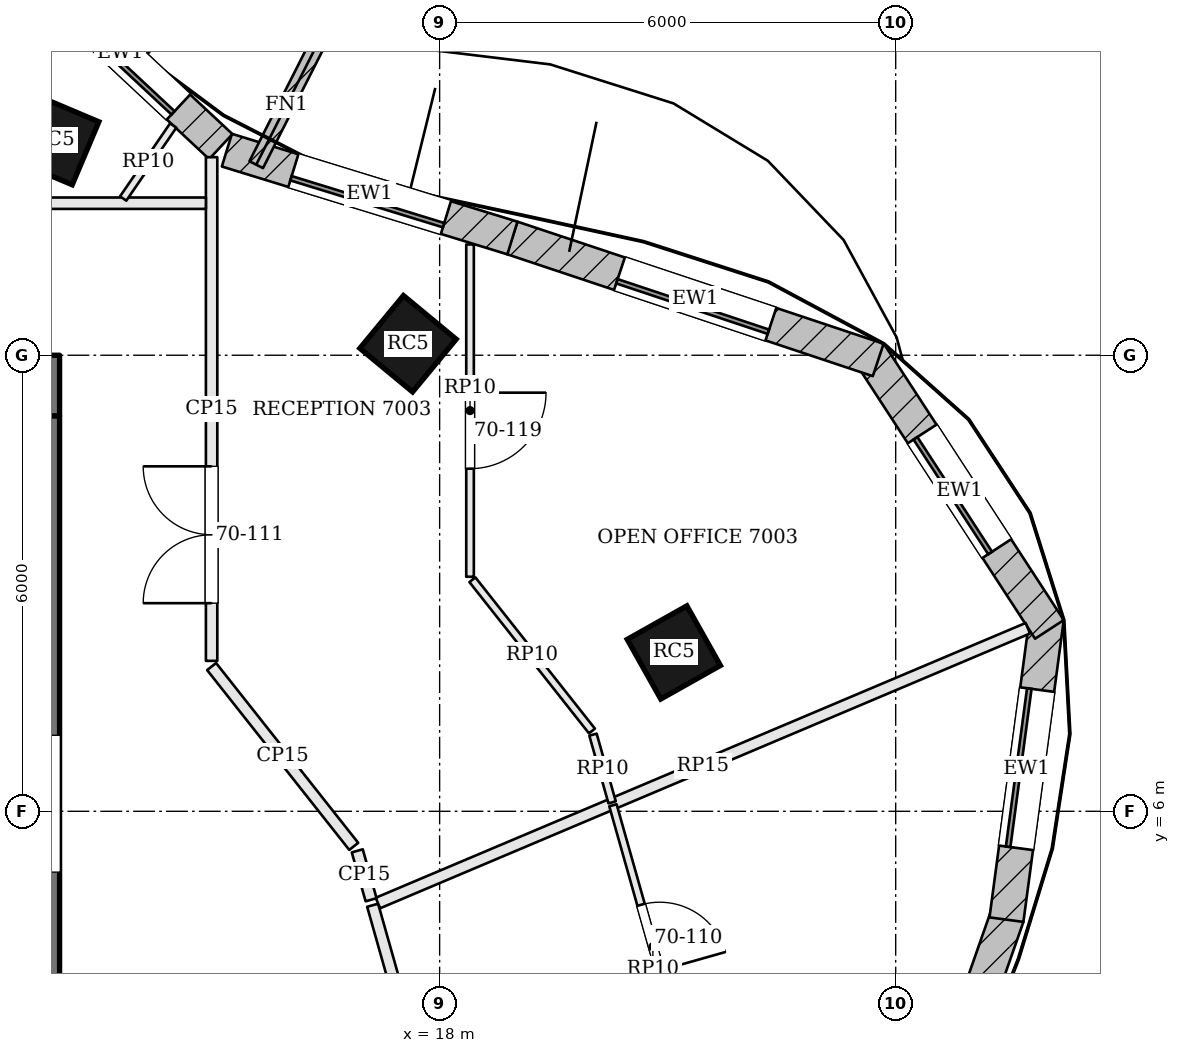
"""IFC4 building model, lengths in metres.
Left out: names, types, materials, properties, quantities, classifications, styles, units other than length and angle.
Written with IfcOpenShell. Run it as: python <this file> out.ifc"""

import sys

from ifc_helpers import new_model, si_unit, direction, frame, frame_2d, origin, origin_2d, place, context, subcontext, project, spatial, rectangle, extrude, element, fill, save


model = new_model("IFC4")
c1 = context("Model", 3, precision=1e-05, world=origin(), true_north=direction((0.0, 1.0)))
c2 = subcontext(c1, "Body", "Model", "MODEL_VIEW")
j1 = project(units=[si_unit("LENGTHUNIT", "METRE"), si_unit("PLANEANGLEUNIT", "RADIAN")], contexts=[c1])
p1 = place(None, origin())
s1 = spatial("IfcSite", under=j1, at=p1, CompositionType="ELEMENT")
p2 = place(p1, origin())
s2 = spatial("IfcBuilding", under=s1, at=p2, CompositionType="ELEMENT")
p3 = place(p2, frame((0.0, 0.0, 284.4)))
s3 = spatial("IfcBuildingStorey", under=s2, at=p3, CompositionType="ELEMENT", Elevation=284.4)
p4 = place(p3, frame((-13.0, 11.6, 0.0), z_axis=(0.0, 0.0, 1.0), x_axis=(1.0, 0.0, 0.0)))
e1 = element("IfcWall", 1, at=p4, inside=s3, PredefinedType="SHEAR", context=c2, shape_type="SweptSolid", body=[
    extrude(rectangle(XDim=26.0, YDim=0.8, at=frame_2d((13.0, 0.0))), origin(), (0.0, 0.0, 1.0), 3.9),
])
p5 = place(p4, frame((9.65, 0.0, 0.0)))
e2 = element("IfcOpeningElement", 2, at=p5, cuts=e1, PredefinedType="OPENING", context=c2, shape_type="SweptSolid", body=[
    extrude(rectangle(XDim=1.0, YDim=2.1, at=frame_2d((0.5, 1.05))), frame((0.0, 0.41, 0.0), z_axis=(0.0, -1.0, 0.0), x_axis=(1.0, 0.0, 0.0)), (0.0, 0.0, 1.0), 0.82),
])
p6 = place(p4, frame((12.675, 0.0, 0.0)))
e3 = element("IfcOpeningElement", 3, at=p6, cuts=e1, PredefinedType="OPENING", context=c2, shape_type="SweptSolid", body=[
    extrude(rectangle(XDim=0.7, YDim=2.1, at=frame_2d((0.35, 1.05))), frame((0.0, 0.41, 0.0), z_axis=(0.0, -1.0, 0.0), x_axis=(1.0, 0.0, 0.0)), (0.0, 0.0, 1.0), 0.82),
])
p7 = place(p4, frame((14.725, 0.0, 0.0)))
e4 = element("IfcOpeningElement", 4, at=p7, cuts=e1, PredefinedType="OPENING", context=c2, shape_type="SweptSolid", body=[
    extrude(rectangle(XDim=0.7, YDim=2.1, at=frame_2d((0.35, 1.05))), frame((0.0, 0.41, 0.0), z_axis=(0.0, -1.0, 0.0), x_axis=(1.0, 0.0, 0.0)), (0.0, 0.0, 1.0), 0.82),
])
p8 = place(p4, frame((16.6, 0.0, 0.0)))
e5 = element("IfcOpeningElement", 5, at=p8, cuts=e1, PredefinedType="OPENING", context=c2, shape_type="SweptSolid", body=[
    extrude(rectangle(XDim=1.0, YDim=2.1, at=frame_2d((0.5, 1.05))), frame((0.0, 0.41, 0.0), z_axis=(0.0, -1.0, 0.0), x_axis=(1.0, 0.0, 0.0)), (0.0, 0.0, 1.0), 0.82),
])
p9 = place(p3, frame((12.6, -2.2, 0.0), z_axis=(0.0, 0.0, 1.0), x_axis=(0.0, 1.0, 0.0)))
e6 = element("IfcWall", 6, at=p9, inside=s3, PredefinedType="SHEAR", context=c2, shape_type="SweptSolid", body=[
    extrude(rectangle(XDim=13.4, YDim=0.8, at=frame_2d((6.7, 0.0))), origin(), (0.0, 0.0, 1.0), 3.9),
])
p10 = place(p9, frame((7.4, 0.0, 0.0)))
e7 = element("IfcOpeningElement", 7, at=p10, cuts=e6, PredefinedType="OPENING", context=c2, shape_type="SweptSolid", body=[
    extrude(rectangle(XDim=1.8, YDim=2.1, at=frame_2d((0.9, 1.05))), frame((0.0, 0.41, 0.0), z_axis=(0.0, -1.0, 0.0), x_axis=(1.0, 0.0, 0.0)), (0.0, 0.0, 1.0), 0.82),
])
for number, where, z_axis, x_axis in (
    (8, (21.081, 8.09, 0.0), (0.0, 0.0, 1.0), (-0.49, 0.872, 0.0)),
    (9, (17.584, 12.151, 0.0), (0.0, 0.0, 1.0), (-0.771, 0.637, 0.0)),
    (10, (12.927, 14.832, 0.0), (0.0, 0.0, 1.0), (-0.921, 0.389, 0.0)),
):
    element("IfcColumn", number, at=place(p3, frame(where, z_axis=z_axis, x_axis=x_axis)), inside=s3, PredefinedType="COLUMN", context=c2, shape_type="SweptSolid", body=[
        extrude(rectangle(XDim=0.9, YDim=0.9, at=origin_2d()), origin(), (0.0, 0.0, 1.0), 3.9),
    ])
p11 = place(p3, frame((23.782, -0.189, 0.0), z_axis=(0.0, 0.0, 1.0), x_axis=(0.330794307703, 0.943702880144, 0.0)))
e11 = element("IfcWall", 11, at=p11, inside=s3, PredefinedType="SOLIDWALL", context=c2, shape_type="SweptSolid", body=[
    extrude(rectangle(XDim=5.095, YDim=0.45, at=frame_2d((2.548, 0.0))), origin(), (0.0, 0.0, 1.0), 3.7),
])
p12 = place(p11, frame((1.498, 0.0, 0.9)))
e12 = element("IfcOpeningElement", 12, at=p12, cuts=e11, PredefinedType="OPENING", context=c2, shape_type="SweptSolid", body=[
    extrude(rectangle(XDim=2.1, YDim=2.3, at=frame_2d((1.05, 1.15))), frame((0.0, 0.235, 0.0), z_axis=(0.0, -1.0, 0.0), x_axis=(1.0, 0.0, 0.0)), (0.0, 0.0, 1.0), 0.47),
])
p13 = place(p3, frame((25.457, 4.575, 0.0), z_axis=(0.0, 0.0, 1.0), x_axis=(0.132475046402, 0.991186340746, 0.0)))
e13 = element("IfcWall", 13, at=p13, inside=s3, PredefinedType="SOLIDWALL", context=c2, shape_type="SweptSolid", body=[
    extrude(rectangle(XDim=4.007, YDim=0.45, at=frame_2d((2.003, 0.0))), origin(), (0.0, 0.0, 1.0), 3.7),
])
p14 = place(p13, frame((0.953, 0.0, 0.9)))
e14 = element("IfcOpeningElement", 14, at=p14, cuts=e13, PredefinedType="OPENING", context=c2, shape_type="SweptSolid", body=[
    extrude(rectangle(XDim=2.1, YDim=2.3, at=frame_2d((1.05, 1.15))), frame((0.0, 0.235, 0.0), z_axis=(0.0, -1.0, 0.0), x_axis=(1.0, 0.0, 0.0)), (0.0, 0.0, 1.0), 0.47),
])
p15 = place(p3, frame((26.022, 8.393, 0.0), z_axis=(0.0, 0.0, 1.0), x_axis=(-0.545637310328, 0.838021435035, 0.0)))
e15 = element("IfcWall", 15, at=p15, inside=s3, PredefinedType="SOLIDWALL", context=c2, shape_type="SweptSolid", body=[
    extrude(rectangle(XDim=4.336, YDim=0.45, at=frame_2d((2.168, 0.0))), origin(), (0.0, 0.0, 1.0), 3.7),
])
p16 = place(p15, frame((1.268, 0.0, 0.9)))
e16 = element("IfcOpeningElement", 16, at=p16, cuts=e15, PredefinedType="OPENING", context=c2, shape_type="SweptSolid", body=[
    extrude(rectangle(XDim=1.8, YDim=2.3, at=frame_2d((0.9, 1.15))), frame((0.0, 0.235, 0.0), z_axis=(0.0, -1.0, 0.0), x_axis=(1.0, 0.0, 0.0)), (0.0, 0.0, 1.0), 0.47),
])
p17 = place(p3, frame((23.77, 11.938, 0.0), z_axis=(0.0, 0.0, 1.0), x_axis=(-0.948673679101, 0.316256621402, 0.0)))
e17 = element("IfcWall", 17, at=p17, inside=s3, PredefinedType="SOLIDWALL", context=c2, shape_type="SweptSolid", body=[
    extrude(rectangle(XDim=5.076, YDim=0.45, at=frame_2d((2.538, 0.0))), origin(), (0.0, 0.0, 1.0), 3.7),
])
p18 = place(p17, frame((1.488, 0.0, 0.9)))
e18 = element("IfcOpeningElement", 18, at=p18, cuts=e17, PredefinedType="OPENING", context=c2, shape_type="SweptSolid", body=[
    extrude(rectangle(XDim=2.1, YDim=2.3, at=frame_2d((1.05, 1.15))), frame((0.0, 0.235, 0.0), z_axis=(0.0, -1.0, 0.0), x_axis=(1.0, 0.0, 0.0)), (0.0, 0.0, 1.0), 0.47),
])
p19 = place(p3, frame((18.958, 13.542, 0.0), z_axis=(0.0, 0.0, 1.0), x_axis=(-0.955792437529, 0.294042201668, 0.0)))
e19 = element("IfcWall", 19, at=p19, inside=s3, PredefinedType="SOLIDWALL", context=c2, shape_type="SweptSolid", body=[
    extrude(rectangle(XDim=3.931, YDim=0.45, at=frame_2d((1.965, 0.0))), origin(), (0.0, 0.0, 1.0), 3.7),
])
p20 = place(p19, frame((0.915, 0.0, 0.9)))
e20 = element("IfcOpeningElement", 20, at=p20, cuts=e19, PredefinedType="OPENING", context=c2, shape_type="SweptSolid", body=[
    extrude(rectangle(XDim=2.1, YDim=2.3, at=frame_2d((1.05, 1.15))), frame((0.0, 0.235, 0.0), z_axis=(0.0, -1.0, 0.0), x_axis=(1.0, 0.0, 0.0)), (0.0, 0.0, 1.0), 0.47),
])
p21 = place(p3, frame((15.121, 14.745, 0.0), z_axis=(0.0, 0.0, 1.0), x_axis=(-0.730618259172, 0.68278617397, 0.0)))
e21 = element("IfcWall", 21, at=p21, inside=s3, PredefinedType="SOLIDWALL", context=c2, shape_type="SweptSolid", body=[
    extrude(rectangle(XDim=3.624, YDim=0.45, at=frame_2d((1.812, 0.0))), origin(), (0.0, 0.0, 1.0), 3.7),
])
p22 = place(p21, frame((0.762, 0.0, 0.9)))
e22 = element("IfcOpeningElement", 22, at=p22, cuts=e21, PredefinedType="OPENING", context=c2, shape_type="SweptSolid", body=[
    extrude(rectangle(XDim=2.1, YDim=2.3, at=frame_2d((1.05, 1.15))), frame((0.0, 0.235, 0.0), z_axis=(0.0, -1.0, 0.0), x_axis=(1.0, 0.0, 0.0)), (0.0, 0.0, 1.0), 0.47),
])
p23 = place(p3, frame((15.587, 14.507, 0.0), z_axis=(0.0, 0.0, 1.0), x_axis=(0.452117231361, 0.89195852432, 0.0)))
e23 = element("IfcWall", 23, at=p23, inside=s3, PredefinedType="SOLIDWALL", context=c2, shape_type="SweptSolid", body=[
    extrude(rectangle(XDim=1.75, YDim=0.2, at=frame_2d((0.875, 0.0))), origin(), (0.0, 0.0, 1.0), 3.7),
])
p24 = place(p3, frame((17.9, 2.0, 0.0), z_axis=(0.0, 0.0, 1.0), x_axis=(-0.271980959701, 0.962302633042, 0.0)))
e24 = element("IfcWall", 24, at=p24, inside=s3, PredefinedType="PARTITIONING", context=c2, shape_type="SweptSolid", body=[
    extrude(rectangle(XDim=2.873, YDim=0.15, at=frame_2d((1.436, 0.0))), origin(), (0.0, 0.0, 1.0), 3.198),
])
p25 = place(p3, frame((25.739, 8.408, 0.0), z_axis=(0.0, 0.0, 1.0), x_axis=(-0.92106014218, -0.389420357052, 0.0)))
e25 = element("IfcWall", 25, at=p25, inside=s3, PredefinedType="PARTITIONING", context=c2, shape_type="SweptSolid", body=[
    extrude(rectangle(XDim=9.284, YDim=0.15, at=frame_2d((4.642, 0.0))), origin(), (0.0, 0.0, 1.0), 3.234),
])
p26 = place(p3, frame((17.098, 4.836, 0.0), z_axis=(0.0, 0.0, 1.0), x_axis=(-0.271971703561, 0.962305249109, 0.0)))
e26 = element("IfcWall", 26, at=p26, inside=s3, PredefinedType="PARTITIONING", context=c2, shape_type="SweptSolid", body=[
    extrude(rectangle(XDim=0.669, YDim=0.15, at=frame_2d((0.334, 0.0))), origin(), (0.0, 0.0, 1.0), 3.198),
])
p27 = place(p3, frame((16.87, 5.539, 0.0), z_axis=(0.0, 0.0, 1.0), x_axis=(-0.620093074114, 0.784528252796, 0.0)))
e27 = element("IfcWall", 27, at=p27, inside=s3, PredefinedType="PARTITIONING", context=c2, shape_type="SweptSolid", body=[
    extrude(rectangle(XDim=3.015, YDim=0.15, at=frame_2d((1.508, 0.0))), origin(), (0.0, 0.0, 1.0), 3.198),
])
p28 = place(p3, frame((15.0, 7.979, 0.0), z_axis=(0.0, 0.0, 1.0), x_axis=(0.0, 1.0, 0.0)))
e28 = element("IfcWall", 28, at=p28, inside=s3, PredefinedType="PARTITIONING", context=c2, shape_type="SweptSolid", body=[
    extrude(rectangle(XDim=6.626, YDim=0.15, at=frame_2d((3.313, 0.0))), origin(), (0.0, 0.0, 1.0), 3.198),
])
p29 = place(p28, frame((0.759, 0.0, 0.0)))
e29 = element("IfcOpeningElement", 29, at=p29, cuts=e28, PredefinedType="OPENING", context=c2, shape_type="SweptSolid", body=[
    extrude(rectangle(XDim=1.8, YDim=2.1, at=frame_2d((0.9, 1.05))), frame((0.0, 0.085, 0.0), z_axis=(0.0, -1.0, 0.0), x_axis=(1.0, 0.0, 0.0)), (0.0, 0.0, 1.0), 0.17),
])
p30 = place(p3, frame((14.925, 14.0, 0.0), z_axis=(0.0, 0.0, 1.0), x_axis=(-1.0, 0.0, 0.0)))
e30 = element("IfcWall", 30, at=p30, inside=s3, PredefinedType="PARTITIONING", context=c2, shape_type="SweptSolid", body=[
    extrude(rectangle(XDim=11.827, YDim=0.15, at=frame_2d((5.914, 0.0))), origin(), (0.0, 0.0, 1.0), 3.198),
])
p31 = place(p30, frame((3.25, 0.0, 0.0)))
e31 = element("IfcOpeningElement", 31, at=p31, cuts=e30, PredefinedType="OPENING", context=c2, shape_type="SweptSolid", body=[
    extrude(rectangle(XDim=1.0, YDim=2.1, at=frame_2d((0.5, 1.05))), frame((0.0, 0.085, 0.0), z_axis=(0.0, -1.0, 0.0), x_axis=(1.0, 0.0, 0.0)), (0.0, 0.0, 1.0), 0.17),
])
p32 = place(p30, frame((8.55, 0.0, 0.0)))
e32 = element("IfcOpeningElement", 32, at=p32, cuts=e30, PredefinedType="OPENING", context=c2, shape_type="SweptSolid", body=[
    extrude(rectangle(XDim=1.0, YDim=2.1, at=frame_2d((0.5, 1.05))), frame((0.0, 0.085, 0.0), z_axis=(0.0, -1.0, 0.0), x_axis=(1.0, 0.0, 0.0)), (0.0, 0.0, 1.0), 0.17),
])
p33 = place(p3, frame((20.28, 6.079, 0.0), z_axis=(0.0, 0.0, 1.0), x_axis=(0.271974810721, -0.962304370942, 0.0)))
e33 = element("IfcWall", 33, at=p33, inside=s3, PredefinedType="PARTITIONING", context=c2, shape_type="SweptSolid", body=[
    extrude(rectangle(XDim=3.865, YDim=0.1, at=frame_2d((1.932, 0.0))), origin(), (0.0, 0.0, 1.0), 3.198),
])
p34 = place(p33, frame((1.36, 0.0, 0.0)))
e34 = element("IfcOpeningElement", 34, at=p34, cuts=e33, PredefinedType="OPENING", context=c2, shape_type="SweptSolid", body=[
    extrude(rectangle(XDim=0.9, YDim=2.1, at=frame_2d((0.45, 1.05))), frame((0.0, 0.06, 0.0), z_axis=(0.0, -1.0, 0.0), x_axis=(1.0, 0.0, 0.0)), (0.0, 0.0, 1.0), 0.12),
])
p35 = place(p3, frame((18.4, 13.458, 0.0), z_axis=(0.0, 0.0, 1.0), x_axis=(0.0, -1.0, 0.0)))
e35 = element("IfcWall", 35, at=p35, inside=s3, PredefinedType="PARTITIONING", context=c2, shape_type="SweptSolid", body=[
    extrude(rectangle(XDim=4.372, YDim=0.1, at=frame_2d((2.186, 0.0))), origin(), (0.0, 0.0, 1.0), 3.198),
])
p36 = place(p35, frame((1.95, 0.0, 0.0)))
e36 = element("IfcOpeningElement", 36, at=p36, cuts=e35, PredefinedType="OPENING", context=c2, shape_type="SweptSolid", body=[
    extrude(rectangle(XDim=1.0, YDim=2.1, at=frame_2d((0.5, 1.05))), frame((0.0, 0.06, 0.0), z_axis=(0.0, -1.0, 0.0), x_axis=(1.0, 0.0, 0.0)), (0.0, 0.0, 1.0), 0.12),
])
p37 = place(p3, frame((18.431, 9.046, 0.0), z_axis=(0.0, 0.0, 1.0), x_axis=(0.620118511479, -0.78450814637, 0.0)))
e37 = element("IfcWall", 37, at=p37, inside=s3, PredefinedType="PARTITIONING", context=c2, shape_type="SweptSolid", body=[
    extrude(rectangle(XDim=2.537, YDim=0.1, at=frame_2d((1.268, 0.0))), origin(), (0.0, 0.0, 1.0), 3.198),
])
p38 = place(p3, frame((20.018, 7.008, 0.0), z_axis=(0.0, 0.0, 1.0), x_axis=(0.272036681058, -0.962286882462, 0.0)))
e38 = element("IfcWall", 38, at=p38, inside=s3, PredefinedType="PARTITIONING", context=c2, shape_type="SweptSolid", body=[
    extrude(rectangle(XDim=0.925, YDim=0.1, at=frame_2d((0.463, 0.0))), origin(), (0.0, 0.0, 1.0), 3.198),
])
p39 = place(p3, frame((13.837, 14.062, 0.0), z_axis=(0.0, 0.0, 1.0), x_axis=(0.565495744886, 0.824751212497, 0.0)))
e39 = element("IfcWall", 39, at=p39, inside=s3, PredefinedType="PARTITIONING", context=c2, shape_type="SweptSolid", body=[
    extrude(rectangle(XDim=1.164, YDim=0.1, at=frame_2d((0.582, 0.0))), origin(), (0.0, 0.0, 1.0), 3.198),
])
p40 = place(p14, origin())
e40 = element("IfcWindow", 40, at=p40, inside=s3, PartitioningType="SINGLE_PANEL", PredefinedType="WINDOW", context=c2, shape_type="SweptSolid", body=[
    extrude(rectangle(XDim=2.1, YDim=2.3, at=frame_2d((1.05, 1.15))), frame((0.0, 0.135, 0.0), z_axis=(0.0, -1.0, 0.0), x_axis=(1.0, 0.0, 0.0)), (0.0, 0.0, 1.0), 0.06),
])
fill(e14, e40)
p41 = place(p16, origin())
e41 = element("IfcWindow", 41, at=p41, inside=s3, PartitioningType="SINGLE_PANEL", PredefinedType="WINDOW", context=c2, shape_type="SweptSolid", body=[
    extrude(rectangle(XDim=1.8, YDim=2.3, at=frame_2d((0.9, 1.15))), frame((0.0, 0.135, 0.0), z_axis=(0.0, -1.0, 0.0), x_axis=(1.0, 0.0, 0.0)), (0.0, 0.0, 1.0), 0.06),
])
fill(e16, e41)
p42 = place(p18, origin())
e42 = element("IfcWindow", 42, at=p42, inside=s3, PartitioningType="SINGLE_PANEL", PredefinedType="WINDOW", context=c2, shape_type="SweptSolid", body=[
    extrude(rectangle(XDim=2.1, YDim=2.3, at=frame_2d((1.05, 1.15))), frame((0.0, 0.135, 0.0), z_axis=(0.0, -1.0, 0.0), x_axis=(1.0, 0.0, 0.0)), (0.0, 0.0, 1.0), 0.06),
])
fill(e18, e42)
p43 = place(p20, origin())
e43 = element("IfcWindow", 43, at=p43, inside=s3, PartitioningType="SINGLE_PANEL", PredefinedType="WINDOW", context=c2, shape_type="SweptSolid", body=[
    extrude(rectangle(XDim=2.1, YDim=2.3, at=frame_2d((1.05, 1.15))), frame((0.0, 0.135, 0.0), z_axis=(0.0, -1.0, 0.0), x_axis=(1.0, 0.0, 0.0)), (0.0, 0.0, 1.0), 0.06),
])
fill(e20, e43)
p44 = place(p22, origin())
e44 = element("IfcWindow", 44, at=p44, inside=s3, PartitioningType="SINGLE_PANEL", PredefinedType="WINDOW", context=c2, shape_type="SweptSolid", body=[
    extrude(rectangle(XDim=2.1, YDim=2.3, at=frame_2d((1.05, 1.15))), frame((0.0, 0.135, 0.0), z_axis=(0.0, -1.0, 0.0), x_axis=(1.0, 0.0, 0.0)), (0.0, 0.0, 1.0), 0.06),
])
fill(e22, e44)
p45 = place(p34, origin())
e45 = element("IfcDoor", 45, at=p45, inside=s3, OperationType="SINGLE_SWING_RIGHT", PredefinedType="DOOR", context=c2, shape_type="SweptSolid", body=[
    extrude(rectangle(XDim=0.9, YDim=2.1, at=frame_2d((0.45, 1.05))), frame((0.0, 0.025, 0.0), z_axis=(0.0, -1.0, 0.0), x_axis=(1.0, 0.0, 0.0)), (0.0, 0.0, 1.0), 0.05),
])
fill(e34, e45)
p46 = place(p29, origin())
e46 = element("IfcDoor", 46, at=p46, inside=s3, OperationType="DOUBLE_DOOR_SINGLE_SWING", PredefinedType="DOOR", context=c2, shape_type="SweptSolid", body=[
    extrude(rectangle(XDim=1.8, YDim=2.1, at=frame_2d((0.9, 1.05))), frame((0.0, 0.025, 0.0), z_axis=(0.0, -1.0, 0.0), x_axis=(1.0, 0.0, 0.0)), (0.0, 0.0, 1.0), 0.05),
])
fill(e29, e46)
p47 = place(p36, origin())
e47 = element("IfcDoor", 47, at=p47, inside=s3, OperationType="SINGLE_SWING_LEFT", PredefinedType="DOOR", context=c2, shape_type="SweptSolid", body=[
    extrude(rectangle(XDim=1.0, YDim=2.1, at=frame_2d((0.5, 1.05))), frame((0.0, 0.025, 0.0), z_axis=(0.0, -1.0, 0.0), x_axis=(1.0, 0.0, 0.0)), (0.0, 0.0, 1.0), 0.05),
])
fill(e36, e47)
save(model, sys.argv[1])
